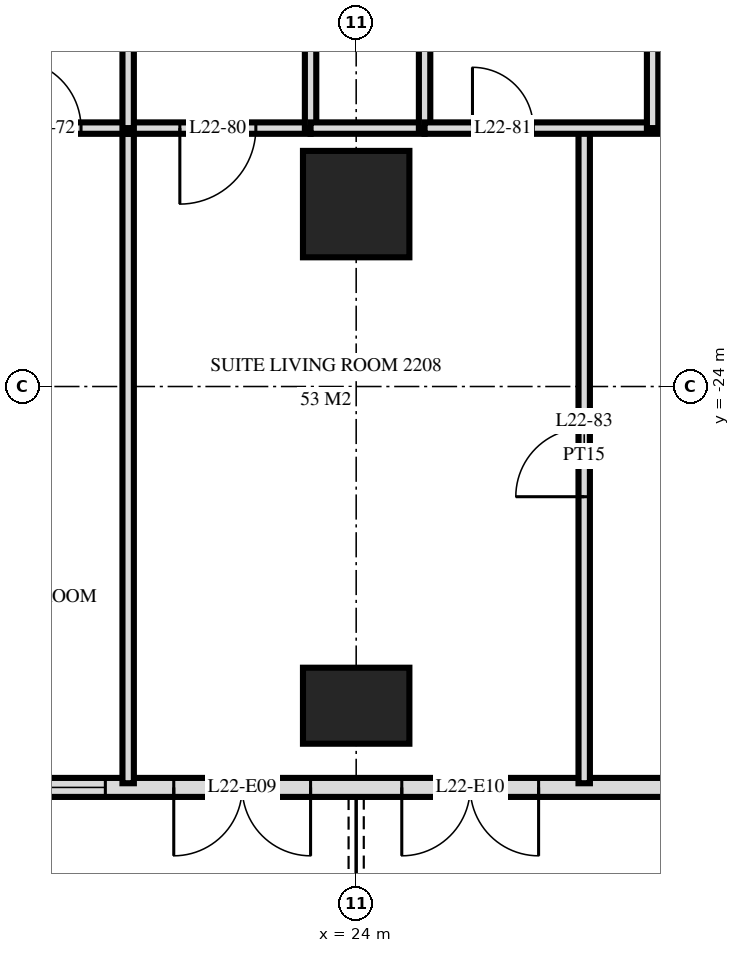
"""IFC4 building model, lengths in metres.
Left out: names, types, materials, properties, quantities, classifications, styles, units other than length and angle.
Written with IfcOpenShell. Run it as: python <this file> out.ifc"""

import sys

from ifc_helpers import new_model, si_unit, direction, frame, frame_2d, origin, origin_2d, place, context, subcontext, project, spatial, rectangle, extrude, element, fill, save


model = new_model("IFC4")
c1 = context("Model", 3, precision=1e-05, world=origin(), true_north=direction((0.0, 1.0)))
c2 = subcontext(c1, "Body", "Model", "MODEL_VIEW")
j1 = project(units=[si_unit("LENGTHUNIT", "METRE"), si_unit("PLANEANGLEUNIT", "RADIAN")], contexts=[c1])
p1 = place(None, origin())
s1 = spatial("IfcSite", under=j1, at=p1, CompositionType="ELEMENT")
p2 = place(p1, origin())
s2 = spatial("IfcBuilding", under=s1, at=p2, CompositionType="ELEMENT")
p3 = place(p2, frame((0.0, 0.0, 88.8)))
s3 = spatial("IfcBuildingStorey", under=s2, at=p3, CompositionType="ELEMENT", Elevation=88.8)
p4 = place(p3, frame((24.0, -28.2, 0.0), z_axis=(0.0, 0.0, 1.0), x_axis=(1.0, 0.0, 0.0)))
e1 = element("IfcColumn", 1, at=p4, inside=s3, PredefinedType="COLUMN", context=c2, shape_type="SweptSolid", body=[
    extrude(rectangle(XDim=1.4, YDim=1.0, at=origin_2d()), origin(), (0.0, 0.0, 1.0), 3.6),
])
p5 = place(p3, frame((24.0, -21.6, 0.0), z_axis=(0.0, 0.0, 1.0), x_axis=(1.0, 0.0, 0.0)))
e2 = element("IfcColumn", 2, at=p5, inside=s3, PredefinedType="COLUMN", context=c2, shape_type="SweptSolid", body=[
    extrude(rectangle(XDim=1.4, YDim=1.4, at=origin_2d()), origin(), (0.0, 0.0, 1.0), 3.6),
])
p6 = place(p3, frame((-28.775, -29.275, 0.0), z_axis=(0.0, 0.0, 1.0), x_axis=(1.0, 0.0, 0.0)))
e3 = element("IfcWall", 3, at=p6, inside=s3, PredefinedType="SOLIDWALL", context=c2, shape_type="SweptSolid", body=[
    extrude(rectangle(XDim=57.551, YDim=0.25, at=frame_2d((28.775, 0.0))), origin(), (0.0, 0.0, 1.0), 3.32),
])
p7 = place(p6, frame((0.575, 0.0, 0.0)))
e4 = element("IfcOpeningElement", 4, at=p7, cuts=e3, PredefinedType="OPENING", context=c2, shape_type="SweptSolid", body=[
    extrude(rectangle(XDim=1.8, YDim=2.4, at=frame_2d((0.9, 1.2))), frame((0.0, 0.135, 0.0), z_axis=(0.0, -1.0, 0.0), x_axis=(1.0, 0.0, 0.0)), (0.0, 0.0, 1.0), 0.27),
])
p8 = place(p6, frame((5.075, 0.0, 0.3)))
e5 = element("IfcOpeningElement", 5, at=p8, cuts=e3, PredefinedType="OPENING", context=c2, shape_type="SweptSolid", body=[
    extrude(rectangle(XDim=2.4, YDim=2.1, at=frame_2d((1.2, 1.05))), frame((0.0, 0.135, 0.0), z_axis=(0.0, -1.0, 0.0), x_axis=(1.0, 0.0, 0.0)), (0.0, 0.0, 1.0), 0.27),
])
p9 = place(p6, frame((8.375, 0.0, 0.0)))
e6 = element("IfcOpeningElement", 6, at=p9, cuts=e3, PredefinedType="OPENING", context=c2, shape_type="SweptSolid", body=[
    extrude(rectangle(XDim=1.8, YDim=2.4, at=frame_2d((0.9, 1.2))), frame((0.0, 0.135, 0.0), z_axis=(0.0, -1.0, 0.0), x_axis=(1.0, 0.0, 0.0)), (0.0, 0.0, 1.0), 0.27),
])
p10 = place(p6, frame((11.375, 0.0, 0.0)))
e7 = element("IfcOpeningElement", 7, at=p10, cuts=e3, PredefinedType="OPENING", context=c2, shape_type="SweptSolid", body=[
    extrude(rectangle(XDim=1.8, YDim=2.4, at=frame_2d((0.9, 1.2))), frame((0.0, 0.135, 0.0), z_axis=(0.0, -1.0, 0.0), x_axis=(1.0, 0.0, 0.0)), (0.0, 0.0, 1.0), 0.27),
])
p11 = place(p6, frame((14.075, 0.0, 0.3)))
e8 = element("IfcOpeningElement", 8, at=p11, cuts=e3, PredefinedType="OPENING", context=c2, shape_type="SweptSolid", body=[
    extrude(rectangle(XDim=2.4, YDim=2.1, at=frame_2d((1.2, 1.05))), frame((0.0, 0.135, 0.0), z_axis=(0.0, -1.0, 0.0), x_axis=(1.0, 0.0, 0.0)), (0.0, 0.0, 1.0), 0.27),
])
p12 = place(p6, frame((17.375, 0.0, 0.0)))
e9 = element("IfcOpeningElement", 9, at=p12, cuts=e3, PredefinedType="OPENING", context=c2, shape_type="SweptSolid", body=[
    extrude(rectangle(XDim=1.8, YDim=2.4, at=frame_2d((0.9, 1.2))), frame((0.0, 0.135, 0.0), z_axis=(0.0, -1.0, 0.0), x_axis=(1.0, 0.0, 0.0)), (0.0, 0.0, 1.0), 0.27),
])
p13 = place(p6, frame((20.075, 0.0, 0.3)))
e10 = element("IfcOpeningElement", 10, at=p13, cuts=e3, PredefinedType="OPENING", context=c2, shape_type="SweptSolid", body=[
    extrude(rectangle(XDim=2.4, YDim=2.1, at=frame_2d((1.2, 1.05))), frame((0.0, 0.135, 0.0), z_axis=(0.0, -1.0, 0.0), x_axis=(1.0, 0.0, 0.0)), (0.0, 0.0, 1.0), 0.27),
])
p14 = place(p6, frame((23.075, 0.0, 0.3)))
e11 = element("IfcOpeningElement", 11, at=p14, cuts=e3, PredefinedType="OPENING", context=c2, shape_type="SweptSolid", body=[
    extrude(rectangle(XDim=2.4, YDim=2.1, at=frame_2d((1.2, 1.05))), frame((0.0, 0.135, 0.0), z_axis=(0.0, -1.0, 0.0), x_axis=(1.0, 0.0, 0.0)), (0.0, 0.0, 1.0), 0.27),
])
p15 = place(p6, frame((26.375, 0.0, 0.0)))
e12 = element("IfcOpeningElement", 12, at=p15, cuts=e3, PredefinedType="OPENING", context=c2, shape_type="SweptSolid", body=[
    extrude(rectangle(XDim=1.8, YDim=2.4, at=frame_2d((0.9, 1.2))), frame((0.0, 0.135, 0.0), z_axis=(0.0, -1.0, 0.0), x_axis=(1.0, 0.0, 0.0)), (0.0, 0.0, 1.0), 0.27),
])
p16 = place(p6, frame((29.375, 0.0, 0.0)))
e13 = element("IfcOpeningElement", 13, at=p16, cuts=e3, PredefinedType="OPENING", context=c2, shape_type="SweptSolid", body=[
    extrude(rectangle(XDim=1.8, YDim=2.4, at=frame_2d((0.9, 1.2))), frame((0.0, 0.135, 0.0), z_axis=(0.0, -1.0, 0.0), x_axis=(1.0, 0.0, 0.0)), (0.0, 0.0, 1.0), 0.27),
])
p17 = place(p6, frame((32.075, 0.0, 0.3)))
e14 = element("IfcOpeningElement", 14, at=p17, cuts=e3, PredefinedType="OPENING", context=c2, shape_type="SweptSolid", body=[
    extrude(rectangle(XDim=2.4, YDim=2.1, at=frame_2d((1.2, 1.05))), frame((0.0, 0.135, 0.0), z_axis=(0.0, -1.0, 0.0), x_axis=(1.0, 0.0, 0.0)), (0.0, 0.0, 1.0), 0.27),
])
p18 = place(p6, frame((35.375, 0.0, 0.0)))
e15 = element("IfcOpeningElement", 15, at=p18, cuts=e3, PredefinedType="OPENING", context=c2, shape_type="SweptSolid", body=[
    extrude(rectangle(XDim=1.8, YDim=2.4, at=frame_2d((0.9, 1.2))), frame((0.0, 0.135, 0.0), z_axis=(0.0, -1.0, 0.0), x_axis=(1.0, 0.0, 0.0)), (0.0, 0.0, 1.0), 0.27),
])
p19 = place(p6, frame((38.075, 0.0, 0.3)))
e16 = element("IfcOpeningElement", 16, at=p19, cuts=e3, PredefinedType="OPENING", context=c2, shape_type="SweptSolid", body=[
    extrude(rectangle(XDim=2.4, YDim=2.1, at=frame_2d((1.2, 1.05))), frame((0.0, 0.135, 0.0), z_axis=(0.0, -1.0, 0.0), x_axis=(1.0, 0.0, 0.0)), (0.0, 0.0, 1.0), 0.27),
])
p20 = place(p6, frame((41.075, 0.0, 0.3)))
e17 = element("IfcOpeningElement", 17, at=p20, cuts=e3, PredefinedType="OPENING", context=c2, shape_type="SweptSolid", body=[
    extrude(rectangle(XDim=2.4, YDim=2.1, at=frame_2d((1.2, 1.05))), frame((0.0, 0.135, 0.0), z_axis=(0.0, -1.0, 0.0), x_axis=(1.0, 0.0, 0.0)), (0.0, 0.0, 1.0), 0.27),
])
p21 = place(p6, frame((44.375, 0.0, 0.0)))
e18 = element("IfcOpeningElement", 18, at=p21, cuts=e3, PredefinedType="OPENING", context=c2, shape_type="SweptSolid", body=[
    extrude(rectangle(XDim=1.8, YDim=2.4, at=frame_2d((0.9, 1.2))), frame((0.0, 0.135, 0.0), z_axis=(0.0, -1.0, 0.0), x_axis=(1.0, 0.0, 0.0)), (0.0, 0.0, 1.0), 0.27),
])
p22 = place(p6, frame((47.075, 0.0, 0.3)))
e19 = element("IfcOpeningElement", 19, at=p22, cuts=e3, PredefinedType="OPENING", context=c2, shape_type="SweptSolid", body=[
    extrude(rectangle(XDim=2.4, YDim=2.1, at=frame_2d((1.2, 1.05))), frame((0.0, 0.135, 0.0), z_axis=(0.0, -1.0, 0.0), x_axis=(1.0, 0.0, 0.0)), (0.0, 0.0, 1.0), 0.27),
])
p23 = place(p6, frame((50.375, 0.0, 0.0)))
e20 = element("IfcOpeningElement", 20, at=p23, cuts=e3, PredefinedType="OPENING", context=c2, shape_type="SweptSolid", body=[
    extrude(rectangle(XDim=1.8, YDim=2.4, at=frame_2d((0.9, 1.2))), frame((0.0, 0.135, 0.0), z_axis=(0.0, -1.0, 0.0), x_axis=(1.0, 0.0, 0.0)), (0.0, 0.0, 1.0), 0.27),
])
p24 = place(p6, frame((53.375, 0.0, 0.0)))
e21 = element("IfcOpeningElement", 21, at=p24, cuts=e3, PredefinedType="OPENING", context=c2, shape_type="SweptSolid", body=[
    extrude(rectangle(XDim=1.8, YDim=2.4, at=frame_2d((0.9, 1.2))), frame((0.0, 0.135, 0.0), z_axis=(0.0, -1.0, 0.0), x_axis=(1.0, 0.0, 0.0)), (0.0, 0.0, 1.0), 0.27),
])
p25 = place(p3, frame((27.9, -20.6, 0.0), z_axis=(0.0, 0.0, 1.0), x_axis=(0.0, 1.0, 0.0)))
e22 = element("IfcWall", 22, at=p25, inside=s3, PredefinedType="PARTITIONING", context=c2, shape_type="SweptSolid", body=[
    extrude(rectangle(XDim=3.6, YDim=0.15, at=frame_2d((1.8, 0.0))), origin(), (0.0, 0.0, 1.0), 3.32),
])
p26 = place(p3, frame((27.0, -29.22, 0.0), z_axis=(0.0, 0.0, 1.0), x_axis=(0.0, 1.0, 0.0)))
e23 = element("IfcWall", 23, at=p26, inside=s3, PredefinedType="PARTITIONING", context=c2, shape_type="SweptSolid", body=[
    extrude(rectangle(XDim=8.62, YDim=0.15, at=frame_2d((4.31, 0.0))), origin(), (0.0, 0.0, 1.0), 3.32),
])
p27 = place(p26, frame((3.77, 0.0, 0.0)))
e24 = element("IfcOpeningElement", 24, at=p27, cuts=e23, PredefinedType="OPENING", context=c2, shape_type="SweptSolid", body=[
    extrude(rectangle(XDim=0.9, YDim=2.1, at=frame_2d((0.45, 1.05))), frame((0.0, 0.085, 0.0), z_axis=(0.0, -1.0, 0.0), x_axis=(1.0, 0.0, 0.0)), (0.0, 0.0, 1.0), 0.17),
])
p28 = place(p3, frame((24.9, -20.6, 0.0), z_axis=(0.0, 0.0, 1.0), x_axis=(0.0, 1.0, 0.0)))
e25 = element("IfcWall", 25, at=p28, inside=s3, PredefinedType="PLUMBINGWALL", context=c2, shape_type="SweptSolid", body=[
    extrude(rectangle(XDim=3.6, YDim=0.15, at=frame_2d((1.8, 0.0))), origin(), (0.0, 0.0, 1.0), 3.32),
])
p29 = place(p3, frame((23.4, -20.6, 0.0), z_axis=(0.0, 0.0, 1.0), x_axis=(0.0, 1.0, 0.0)))
e26 = element("IfcWall", 26, at=p29, inside=s3, PredefinedType="PARTITIONING", context=c2, shape_type="SweptSolid", body=[
    extrude(rectangle(XDim=3.6, YDim=0.15, at=frame_2d((1.8, 0.0))), origin(), (0.0, 0.0, 1.0), 3.32),
])
p30 = place(p29, frame((1.32, 0.0, 0.0)))
e27 = element("IfcOpeningElement", 27, at=p30, cuts=e26, PredefinedType="OPENING", context=c2, shape_type="SweptSolid", body=[
    extrude(rectangle(XDim=1.0, YDim=2.1, at=frame_2d((0.5, 1.05))), frame((0.0, 0.085, 0.0), z_axis=(0.0, -1.0, 0.0), x_axis=(1.0, 0.0, 0.0)), (0.0, 0.0, 1.0), 0.17),
])
p31 = place(p3, frame((21.0, -20.6, 0.0), z_axis=(0.0, 0.0, 1.0), x_axis=(0.0, 1.0, 0.0)))
e28 = element("IfcWall", 28, at=p31, inside=s3, PredefinedType="PARTITIONING", context=c2, shape_type="SweptSolid", body=[
    extrude(rectangle(XDim=3.6, YDim=0.15, at=frame_2d((1.8, 0.0))), origin(), (0.0, 0.0, 1.0), 3.32),
])
p32 = place(p3, frame((21.0, -29.22, 0.0), z_axis=(0.0, 0.0, 1.0), x_axis=(0.0, 1.0, 0.0)))
e29 = element("IfcWall", 29, at=p32, inside=s3, PredefinedType="PARTITIONING", context=c2, shape_type="SweptSolid", body=[
    extrude(rectangle(XDim=8.62, YDim=0.15, at=frame_2d((4.31, 0.0))), origin(), (0.0, 0.0, 1.0), 3.32),
])
p33 = place(p3, frame((21.0, -20.6, 0.0), z_axis=(0.0, 0.0, 1.0), x_axis=(1.0, 0.0, 0.0)))
e30 = element("IfcWall", 30, at=p33, inside=s3, PredefinedType="PARTITIONING", context=c2, shape_type="SweptSolid", body=[
    extrude(rectangle(XDim=2.4, YDim=0.15, at=frame_2d((1.2, 0.0))), origin(), (0.0, 0.0, 1.0), 3.32),
])
p34 = place(p33, frame((0.68, 0.0, 0.0)))
e31 = element("IfcOpeningElement", 31, at=p34, cuts=e30, PredefinedType="OPENING", context=c2, shape_type="SweptSolid", body=[
    extrude(rectangle(XDim=1.0, YDim=2.1, at=frame_2d((0.5, 1.05))), frame((0.0, 0.085, 0.0), z_axis=(0.0, -1.0, 0.0), x_axis=(1.0, 0.0, 0.0)), (0.0, 0.0, 1.0), 0.17),
])
p35 = place(p3, frame((15.9, -20.6, 0.0), z_axis=(0.0, 0.0, 1.0), x_axis=(1.0, 0.0, 0.0)))
e32 = element("IfcWall", 32, at=p35, inside=s3, PredefinedType="PARTITIONING", context=c2, shape_type="SweptSolid", body=[
    extrude(rectangle(XDim=5.1, YDim=0.15, at=frame_2d((2.55, 0.0))), origin(), (0.0, 0.0, 1.0), 3.32),
])
p36 = place(p35, frame((0.5, 0.0, 0.0)))
e33 = element("IfcOpeningElement", 33, at=p36, cuts=e32, PredefinedType="OPENING", context=c2, shape_type="SweptSolid", body=[
    extrude(rectangle(XDim=0.8, YDim=2.1, at=frame_2d((0.4, 1.05))), frame((0.0, 0.085, 0.0), z_axis=(0.0, -1.0, 0.0), x_axis=(1.0, 0.0, 0.0)), (0.0, 0.0, 1.0), 0.17),
])
p37 = place(p35, frame((3.58, 0.0, 0.0)))
e34 = element("IfcOpeningElement", 34, at=p37, cuts=e32, PredefinedType="OPENING", context=c2, shape_type="SweptSolid", body=[
    extrude(rectangle(XDim=0.9, YDim=2.1, at=frame_2d((0.45, 1.05))), frame((0.0, 0.085, 0.0), z_axis=(0.0, -1.0, 0.0), x_axis=(1.0, 0.0, 0.0)), (0.0, 0.0, 1.0), 0.17),
])
p38 = place(p3, frame((24.9, -20.6, 0.0), z_axis=(0.0, 0.0, 1.0), x_axis=(1.0, 0.0, 0.0)))
e35 = element("IfcWall", 35, at=p38, inside=s3, PredefinedType="PARTITIONING", context=c2, shape_type="SweptSolid", body=[
    extrude(rectangle(XDim=8.22, YDim=0.15, at=frame_2d((4.11, 0.0))), origin(), (0.0, 0.0, 1.0), 3.32),
])
p39 = place(p38, frame((0.63, 0.0, 0.0)))
e36 = element("IfcOpeningElement", 36, at=p39, cuts=e35, PredefinedType="OPENING", context=c2, shape_type="SweptSolid", body=[
    extrude(rectangle(XDim=0.8, YDim=2.1, at=frame_2d((0.4, 1.05))), frame((0.0, 0.085, 0.0), z_axis=(0.0, -1.0, 0.0), x_axis=(1.0, 0.0, 0.0)), (0.0, 0.0, 1.0), 0.17),
])
p40 = place(p38, frame((3.4, 0.0, 0.0)))
e37 = element("IfcOpeningElement", 37, at=p40, cuts=e35, PredefinedType="OPENING", context=c2, shape_type="SweptSolid", body=[
    extrude(rectangle(XDim=0.9, YDim=2.1, at=frame_2d((0.45, 1.05))), frame((0.0, 0.085, 0.0), z_axis=(0.0, -1.0, 0.0), x_axis=(1.0, 0.0, 0.0)), (0.0, 0.0, 1.0), 0.17),
])
p41 = place(p3, frame((23.4, -20.6, 0.0), z_axis=(0.0, 0.0, 1.0), x_axis=(1.0, 0.0, 0.0)))
e38 = element("IfcWall", 38, at=p41, inside=s3, PredefinedType="PLUMBINGWALL", context=c2, shape_type="SweptSolid", body=[
    extrude(rectangle(XDim=1.5, YDim=0.15, at=frame_2d((0.75, 0.0))), origin(), (0.0, 0.0, 1.0), 3.32),
])
p42 = place(p22, origin())
e39 = element("IfcWindow", 39, at=p42, inside=s3, PartitioningType="SINGLE_PANEL", PredefinedType="WINDOW", context=c2, shape_type="SweptSolid", body=[
    extrude(rectangle(XDim=2.4, YDim=2.1, at=frame_2d((1.2, 1.05))), frame((0.0, 0.03, 0.0), z_axis=(0.0, -1.0, 0.0), x_axis=(1.0, 0.0, 0.0)), (0.0, 0.0, 1.0), 0.06),
])
fill(e19, e39)
p43 = place(p23, frame((0.9, 0.0, 0.0), z_axis=(0.0, 0.0, 1.0), x_axis=(-1.0, 0.0, 0.0)))
e40 = element("IfcDoor", 40, at=p43, inside=s3, OperationType="DOUBLE_DOOR_SINGLE_SWING", PredefinedType="DOOR", context=c2, shape_type="SweptSolid", body=[
    extrude(rectangle(XDim=1.8, YDim=2.4, at=frame_2d((0.0, 1.2))), frame((0.0, -0.025, 0.0), z_axis=(0.0, 1.0, 0.0), x_axis=(-1.0, 0.0, 0.0)), (0.0, 0.0, 1.0), 0.05),
])
fill(e20, e40)
p44 = place(p24, frame((0.9, 0.0, 0.0), z_axis=(0.0, 0.0, 1.0), x_axis=(-1.0, 0.0, 0.0)))
e41 = element("IfcDoor", 41, at=p44, inside=s3, OperationType="DOUBLE_DOOR_SINGLE_SWING", PredefinedType="DOOR", context=c2, shape_type="SweptSolid", body=[
    extrude(rectangle(XDim=1.8, YDim=2.4, at=frame_2d((0.0, 1.2))), frame((0.0, -0.025, 0.0), z_axis=(0.0, 1.0, 0.0), x_axis=(-1.0, 0.0, 0.0)), (0.0, 0.0, 1.0), 0.05),
])
fill(e21, e41)
p45 = place(p37, origin())
e42 = element("IfcDoor", 42, at=p45, inside=s3, OperationType="SINGLE_SWING_RIGHT", PredefinedType="DOOR", context=c2, shape_type="SweptSolid", body=[
    extrude(rectangle(XDim=0.9, YDim=2.1, at=frame_2d((0.45, 1.05))), frame((0.0, 0.025, 0.0), z_axis=(0.0, -1.0, 0.0), x_axis=(1.0, 0.0, 0.0)), (0.0, 0.0, 1.0), 0.05),
])
fill(e34, e42)
p46 = place(p34, frame((0.5, 0.0, 0.0), z_axis=(0.0, 0.0, 1.0), x_axis=(-1.0, 0.0, 0.0)))
e43 = element("IfcDoor", 43, at=p46, inside=s3, OperationType="SINGLE_SWING_LEFT", PredefinedType="DOOR", context=c2, shape_type="SweptSolid", body=[
    extrude(rectangle(XDim=1.0, YDim=2.1, at=frame_2d((0.0, 1.05))), frame((0.0, -0.025, 0.0), z_axis=(0.0, 1.0, 0.0), x_axis=(-1.0, 0.0, 0.0)), (0.0, 0.0, 1.0), 0.05),
])
fill(e31, e43)
p47 = place(p39, origin())
e44 = element("IfcDoor", 44, at=p47, inside=s3, OperationType="SINGLE_SWING_RIGHT", PredefinedType="DOOR", context=c2, shape_type="SweptSolid", body=[
    extrude(rectangle(XDim=0.8, YDim=2.1, at=frame_2d((0.4, 1.05))), frame((0.0, 0.025, 0.0), z_axis=(0.0, -1.0, 0.0), x_axis=(1.0, 0.0, 0.0)), (0.0, 0.0, 1.0), 0.05),
])
fill(e36, e44)
p48 = place(p27, origin())
e45 = element("IfcDoor", 45, at=p48, inside=s3, OperationType="SINGLE_SWING_RIGHT", PredefinedType="DOOR", context=c2, shape_type="SweptSolid", body=[
    extrude(rectangle(XDim=0.9, YDim=2.1, at=frame_2d((0.45, 1.05))), frame((0.0, 0.025, 0.0), z_axis=(0.0, -1.0, 0.0), x_axis=(1.0, 0.0, 0.0)), (0.0, 0.0, 1.0), 0.05),
])
fill(e24, e45)
save(model, sys.argv[1])
